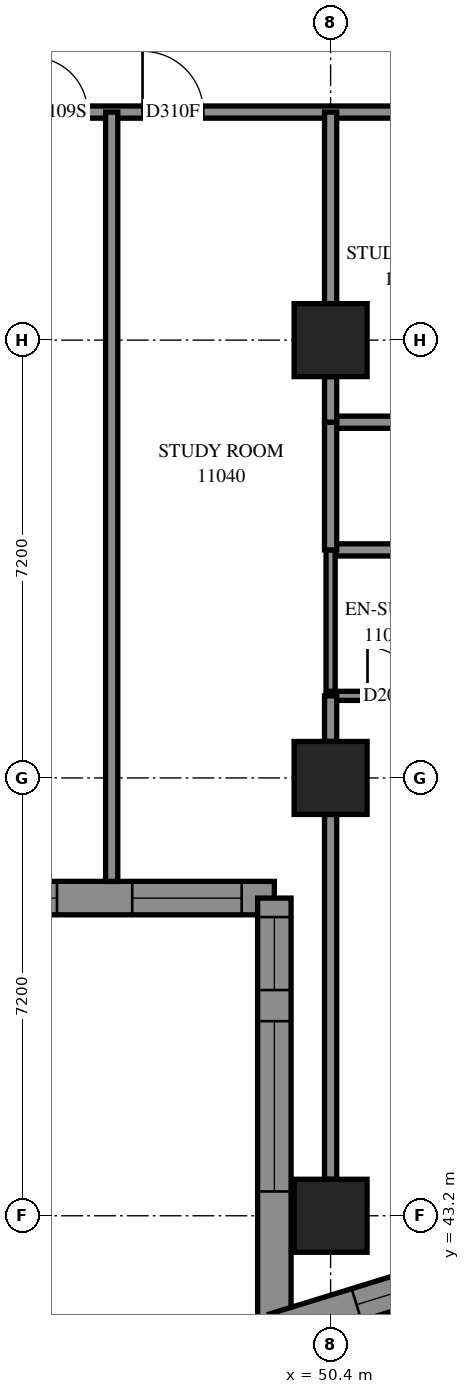
"""IFC4 building model, lengths in metres.
Left out: names, types, materials, properties, quantities, classifications, styles, units other than length and angle.
Written with IfcOpenShell. Run it as: python <this file> out.ifc"""

import sys

from ifc_helpers import new_model, si_unit, direction, frame, frame_2d, origin, origin_2d, place, context, subcontext, project, spatial, polyline, rectangle, outline, extrude, element, fill, save


model = new_model("IFC4")
c1 = context("Model", 3, precision=1e-05, world=origin(), true_north=direction((0.0, 1.0)))
c2 = subcontext(c1, "Body", "Model", "MODEL_VIEW")
j1 = project(units=[si_unit("LENGTHUNIT", "METRE"), si_unit("PLANEANGLEUNIT", "RADIAN")], contexts=[c1])
p1 = place(None, origin())
s1 = spatial("IfcSite", under=j1, at=p1, CompositionType="ELEMENT")
p2 = place(p1, origin())
s2 = spatial("IfcBuilding", under=s1, at=p2, CompositionType="ELEMENT")
p3 = place(p2, frame((0.0, 0.0, 44.0)))
s3 = spatial("IfcBuildingStorey", under=s2, at=p3, CompositionType="ELEMENT", Elevation=44.0)
for number, where, z_axis, x_axis in (
    (1, (50.4, 43.2, 0.0), (0.0, 0.0, 1.0), (1.0, 0.0, 0.0)),
    (2, (50.4, 50.4, 0.0), (0.0, 0.0, 1.0), (1.0, 0.0, 0.0)),
    (3, (50.4, 57.6, 0.0), (0.0, 0.0, 1.0), (1.0, 0.0, 0.0)),
):
    element("IfcColumn", number, at=place(p3, frame(where, z_axis=z_axis, x_axis=x_axis)), inside=s3, PredefinedType="COLUMN", context=c2, shape_type="SweptSolid", body=[
        extrude(rectangle(XDim=1.2, YDim=1.2, at=origin_2d()), origin(), (0.0, 0.0, 1.0), 3.1),
    ])
p4 = place(p3, frame((35.075, 48.424, 0.0), z_axis=(0.0, 0.0, 1.0), x_axis=(1.0, 0.0, 0.0)))
e4 = element("IfcWall", 4, at=p4, inside=s3, PredefinedType="SOLIDWALL", context=c2, shape_type="SweptSolid", body=[
    extrude(outline(polyline([(-0.275, -0.275), (14.125, -0.275), (14.675, 0.275), (0.275, 0.275), (-0.275, -0.275)])), origin(), (0.0, 0.0, 1.0), 3.1),
])
p5 = place(p4, frame((1.825, 0.0, 0.7)))
e5 = element("IfcOpeningElement", 5, at=p5, cuts=e4, PredefinedType="OPENING", context=c2, shape_type="SweptSolid", body=[
    extrude(rectangle(XDim=1.8, YDim=2.0, at=frame_2d((0.9, 1.0))), frame((0.0, 0.285, 0.0), z_axis=(0.0, -1.0, 0.0), x_axis=(1.0, 0.0, 0.0)), (0.0, 0.0, 1.0), 0.57),
])
p6 = place(p4, frame((5.425, 0.0, 0.7)))
e6 = element("IfcOpeningElement", 6, at=p6, cuts=e4, PredefinedType="OPENING", context=c2, shape_type="SweptSolid", body=[
    extrude(rectangle(XDim=1.8, YDim=2.0, at=frame_2d((0.9, 1.0))), frame((0.0, 0.285, 0.0), z_axis=(0.0, -1.0, 0.0), x_axis=(1.0, 0.0, 0.0)), (0.0, 0.0, 1.0), 0.57),
])
p7 = place(p4, frame((9.025, 0.0, 0.7)))
e7 = element("IfcOpeningElement", 7, at=p7, cuts=e4, PredefinedType="OPENING", context=c2, shape_type="SweptSolid", body=[
    extrude(rectangle(XDim=1.8, YDim=2.0, at=frame_2d((0.9, 1.0))), frame((0.0, 0.285, 0.0), z_axis=(0.0, -1.0, 0.0), x_axis=(1.0, 0.0, 0.0)), (0.0, 0.0, 1.0), 0.57),
])
p8 = place(p4, frame((12.062, 0.0, 0.7)))
e8 = element("IfcOpeningElement", 8, at=p8, cuts=e4, PredefinedType="OPENING", context=c2, shape_type="SweptSolid", body=[
    extrude(rectangle(XDim=1.8, YDim=2.0, at=frame_2d((0.9, 1.0))), frame((0.0, 0.285, 0.0), z_axis=(0.0, -1.0, 0.0), x_axis=(1.0, 0.0, 0.0)), (0.0, 0.0, 1.0), 0.57),
])
p9 = place(p3, frame((49.475, 48.424, 0.0), z_axis=(0.0, 0.0, 1.0), x_axis=(0.0, -1.0, 0.0)))
e9 = element("IfcWall", 9, at=p9, inside=s3, PredefinedType="SOLIDWALL", context=c2, shape_type="SweptSolid", body=[
    extrude(outline(polyline([(0.275, -0.275), (7.475, -0.275), (6.73, 0.275), (-0.275, 0.275), (0.275, -0.275)])), origin(), (0.0, 0.0, 1.0), 3.1),
])
p10 = place(p9, frame((2.024, 0.0, 0.5)))
e10 = element("IfcOpeningElement", 10, at=p10, cuts=e9, PredefinedType="OPENING", context=c2, shape_type="SweptSolid", body=[
    extrude(rectangle(XDim=2.8, YDim=2.45, at=frame_2d((1.4, 1.225))), frame((0.0, 0.285, 0.0), z_axis=(0.0, -1.0, 0.0), x_axis=(1.0, 0.0, 0.0)), (0.0, 0.0, 1.0), 0.57),
])
p11 = place(p9, frame((0.312, 0.0, 0.5)))
e11 = element("IfcOpeningElement", 11, at=p11, cuts=e9, PredefinedType="OPENING", context=c2, shape_type="SweptSolid", body=[
    extrude(rectangle(XDim=1.2, YDim=2.45, at=frame_2d((0.6, 1.225))), frame((0.0, 0.285, 0.0), z_axis=(0.0, -1.0, 0.0), x_axis=(1.0, 0.0, 0.0)), (0.0, 0.0, 1.0), 0.57),
])
p12 = place(p3, frame((49.475, 41.321, 0.0), z_axis=(0.0, 0.0, 1.0), x_axis=(0.9557664095, 0.2941267931, 0.0)))
e12 = element("IfcWall", 12, at=p12, inside=s3, PredefinedType="SOLIDWALL", context=c2, shape_type="SweptSolid", body=[
    extrude(outline(polyline([(-0.372, -0.275), (3.201, -0.275), (3.321, 0.275), (0.372, 0.275), (-0.372, -0.275)])), origin(), (0.0, 0.0, 1.0), 3.1),
])
p13 = place(p12, frame((1.414, 0.0, 0.5)))
e13 = element("IfcOpeningElement", 13, at=p13, cuts=e12, PredefinedType="OPENING", context=c2, shape_type="SweptSolid", body=[
    extrude(rectangle(XDim=1.2, YDim=2.45, at=frame_2d((0.6, 1.225))), frame((0.0, 0.285, 0.0), z_axis=(0.0, -1.0, 0.0), x_axis=(1.0, 0.0, 0.0)), (0.0, 0.0, 1.0), 0.57),
])
p14 = place(p3, frame((28.8, 61.35, 0.0), z_axis=(0.0, 0.0, 1.0), x_axis=(1.0, 0.0, 0.0)))
e14 = element("IfcWall", 14, at=p14, inside=s3, PredefinedType="PARTITIONING", context=c2, shape_type="SweptSolid", body=[
    extrude(rectangle(XDim=24.15, YDim=0.2, at=frame_2d((12.075, 0.0))), origin(), (0.0, 0.0, 1.0), 3.1),
])
p15 = place(p14, frame((2.3, 0.0, 0.0)))
e15 = element("IfcOpeningElement", 15, at=p15, cuts=e14, PredefinedType="OPENING", context=c2, shape_type="SweptSolid", body=[
    extrude(rectangle(XDim=0.9, YDim=2.1, at=frame_2d((0.45, 1.05))), frame((0.0, 0.11, 0.0), z_axis=(0.0, -1.0, 0.0), x_axis=(1.0, 0.0, 0.0)), (0.0, 0.0, 1.0), 0.22),
])
p16 = place(p14, frame((4.125, 0.0, 0.0)))
e16 = element("IfcOpeningElement", 16, at=p16, cuts=e14, PredefinedType="OPENING", context=c2, shape_type="SweptSolid", body=[
    extrude(rectangle(XDim=1.0, YDim=2.1, at=frame_2d((0.5, 1.05))), frame((0.0, 0.11, 0.0), z_axis=(0.0, -1.0, 0.0), x_axis=(1.0, 0.0, 0.0)), (0.0, 0.0, 1.0), 0.22),
])
p17 = place(p14, frame((11.061, 0.0, 0.0)))
e17 = element("IfcOpeningElement", 17, at=p17, cuts=e14, PredefinedType="OPENING", context=c2, shape_type="SweptSolid", body=[
    extrude(rectangle(XDim=0.9, YDim=2.1, at=frame_2d((0.45, 1.05))), frame((0.0, 0.11, 0.0), z_axis=(0.0, -1.0, 0.0), x_axis=(1.0, 0.0, 0.0)), (0.0, 0.0, 1.0), 0.22),
])
p18 = place(p14, frame((16.7, 0.0, 0.0)))
e18 = element("IfcOpeningElement", 18, at=p18, cuts=e14, PredefinedType="OPENING", context=c2, shape_type="SweptSolid", body=[
    extrude(rectangle(XDim=0.9, YDim=2.1, at=frame_2d((0.45, 1.05))), frame((0.0, 0.11, 0.0), z_axis=(0.0, -1.0, 0.0), x_axis=(1.0, 0.0, 0.0)), (0.0, 0.0, 1.0), 0.22),
])
p19 = place(p14, frame((18.508, 0.0, 0.0)))
e19 = element("IfcOpeningElement", 19, at=p19, cuts=e14, PredefinedType="OPENING", context=c2, shape_type="SweptSolid", body=[
    extrude(rectangle(XDim=1.0, YDim=2.1, at=frame_2d((0.5, 1.05))), frame((0.0, 0.11, 0.0), z_axis=(0.0, -1.0, 0.0), x_axis=(1.0, 0.0, 0.0)), (0.0, 0.0, 1.0), 0.22),
])
p20 = place(p14, frame((22.882, 0.0, 0.0)))
e20 = element("IfcOpeningElement", 20, at=p20, cuts=e14, PredefinedType="OPENING", context=c2, shape_type="SweptSolid", body=[
    extrude(rectangle(XDim=1.0, YDim=2.1, at=frame_2d((0.5, 1.05))), frame((0.0, 0.11, 0.0), z_axis=(0.0, -1.0, 0.0), x_axis=(1.0, 0.0, 0.0)), (0.0, 0.0, 1.0), 0.22),
])
p21 = place(p3, frame((46.8, 48.699, 0.0), z_axis=(0.0, 0.0, 1.0), x_axis=(0.0, 1.0, 0.0)))
e21 = element("IfcWall", 21, at=p21, inside=s3, PredefinedType="PARTITIONING", context=c2, shape_type="SweptSolid", body=[
    extrude(rectangle(XDim=12.651, YDim=0.2, at=frame_2d((6.325, 0.0))), origin(), (0.0, 0.0, 1.0), 3.1),
])
p22 = place(p3, frame((50.4, 43.8, 0.0), z_axis=(0.0, 0.0, 1.0), x_axis=(0.0, 1.0, 0.0)))
e22 = element("IfcWall", 22, at=p22, inside=s3, PredefinedType="PARTITIONING", context=c2, shape_type="SweptSolid", body=[
    extrude(rectangle(XDim=6.0, YDim=0.2, at=frame_2d((3.0, 0.0))), origin(), (0.0, 0.0, 1.0), 2.6),
])
p23 = place(p3, frame((50.4, 54.15, 0.0), z_axis=(0.0, 0.0, 1.0), x_axis=(1.0, 0.0, 0.0)))
e23 = element("IfcWall", 23, at=p23, inside=s3, PredefinedType="PARTITIONING", context=c2, shape_type="SweptSolid", body=[
    extrude(rectangle(XDim=4.7, YDim=0.2, at=frame_2d((2.35, 0.0))), origin(), (0.0, 0.0, 1.0), 3.1),
])
p24 = place(p23, frame((2.3, 0.0, 0.0)))
e24 = element("IfcOpeningElement", 24, at=p24, cuts=e23, PredefinedType="OPENING", context=c2, shape_type="SweptSolid", body=[
    extrude(rectangle(XDim=0.9, YDim=2.1, at=frame_2d((0.45, 1.05))), frame((0.0, 0.11, 0.0), z_axis=(0.0, -1.0, 0.0), x_axis=(1.0, 0.0, 0.0)), (0.0, 0.0, 1.0), 0.22),
])
p25 = place(p3, frame((50.4, 58.2, 0.0), z_axis=(0.0, 0.0, 1.0), x_axis=(0.0, 1.0, 0.0)))
e25 = element("IfcWall", 25, at=p25, inside=s3, PredefinedType="PARTITIONING", context=c2, shape_type="SweptSolid", body=[
    extrude(rectangle(XDim=3.15, YDim=0.2, at=frame_2d((1.575, 0.0))), origin(), (0.0, 0.0, 1.0), 3.1),
])
p26 = place(p3, frame((50.4, 56.25, 0.0), z_axis=(0.0, 0.0, 1.0), x_axis=(1.0, 0.0, 0.0)))
e26 = element("IfcWall", 26, at=p26, inside=s3, PredefinedType="PARTITIONING", context=c2, shape_type="SweptSolid", body=[
    extrude(rectangle(XDim=2.55, YDim=0.2, at=frame_2d((1.275, 0.0))), origin(), (0.0, 0.0, 1.0), 3.1),
])
p27 = place(p3, frame((50.4, 51.75, 0.0), z_axis=(0.0, 0.0, 1.0), x_axis=(0.0, 1.0, 0.0)))
e27 = element("IfcWall", 27, at=p27, inside=s3, PredefinedType="PARTITIONING", context=c2, shape_type="SweptSolid", body=[
    extrude(rectangle(XDim=2.4, YDim=0.15, at=frame_2d((1.2, 0.0))), origin(), (0.0, 0.0, 1.0), 3.1),
])
p28 = place(p3, frame((50.4, 54.15, 0.0), z_axis=(0.0, 0.0, 1.0), x_axis=(0.0, 1.0, 0.0)))
e28 = element("IfcWall", 28, at=p28, inside=s3, PredefinedType="PARTITIONING", context=c2, shape_type="SweptSolid", body=[
    extrude(rectangle(XDim=2.1, YDim=0.2, at=frame_2d((1.05, 0.0))), origin(), (0.0, 0.0, 1.0), 3.1),
])
p29 = place(p3, frame((50.4, 51.75, 0.0), z_axis=(0.0, 0.0, 1.0), x_axis=(1.0, 0.0, 0.0)))
e29 = element("IfcWall", 29, at=p29, inside=s3, PredefinedType="PARTITIONING", context=c2, shape_type="SweptSolid", body=[
    extrude(rectangle(XDim=1.9, YDim=0.15, at=frame_2d((0.95, 0.0))), origin(), (0.0, 0.0, 1.0), 3.1),
])
p30 = place(p29, frame((0.607, 0.0, 0.0)))
e30 = element("IfcOpeningElement", 30, at=p30, cuts=e29, PredefinedType="OPENING", context=c2, shape_type="SweptSolid", body=[
    extrude(rectangle(XDim=0.8, YDim=2.1, at=frame_2d((0.4, 1.05))), frame((0.0, 0.085, 0.0), z_axis=(0.0, -1.0, 0.0), x_axis=(1.0, 0.0, 0.0)), (0.0, 0.0, 1.0), 0.17),
])
for number, where, z_axis, x_axis in (
    (31, (50.4, 51.0, 0.0), (0.0, 0.0, 1.0), (0.0, 1.0, 0.0)),
    (32, (50.4, 56.25, 0.0), (0.0, 0.0, 1.0), (0.0, 1.0, 0.0)),
):
    element("IfcWall", number, at=place(p3, frame(where, z_axis=z_axis, x_axis=x_axis)), inside=s3, PredefinedType="PARTITIONING", context=c2, shape_type="SweptSolid", body=[
        extrude(rectangle(XDim=0.75, YDim=0.2, at=frame_2d((0.375, 0.0))), origin(), (0.0, 0.0, 1.0), 3.1),
    ])
p31 = place(p7, origin())
e33 = element("IfcWindow", 33, at=p31, inside=s3, PartitioningType="SINGLE_PANEL", PredefinedType="WINDOW", context=c2, shape_type="SweptSolid", body=[
    extrude(rectangle(XDim=1.8, YDim=2.0, at=frame_2d((0.9, 1.0))), frame((0.0, 0.155, 0.0), z_axis=(0.0, -1.0, 0.0), x_axis=(1.0, 0.0, 0.0)), (0.0, 0.0, 1.0), 0.06),
])
fill(e7, e33)
p32 = place(p8, origin())
e34 = element("IfcWindow", 34, at=p32, inside=s3, PartitioningType="SINGLE_PANEL", PredefinedType="WINDOW", context=c2, shape_type="SweptSolid", body=[
    extrude(rectangle(XDim=1.8, YDim=2.0, at=frame_2d((0.9, 1.0))), frame((0.0, 0.155, 0.0), z_axis=(0.0, -1.0, 0.0), x_axis=(1.0, 0.0, 0.0)), (0.0, 0.0, 1.0), 0.06),
])
fill(e8, e34)
p33 = place(p10, origin())
e35 = element("IfcWindow", 35, at=p33, inside=s3, PartitioningType="SINGLE_PANEL", PredefinedType="WINDOW", context=c2, shape_type="SweptSolid", body=[
    extrude(rectangle(XDim=2.8, YDim=2.45, at=frame_2d((1.4, 1.225))), frame((0.0, 0.155, 0.0), z_axis=(0.0, -1.0, 0.0), x_axis=(1.0, 0.0, 0.0)), (0.0, 0.0, 1.0), 0.06),
])
fill(e10, e35)
p34 = place(p11, origin())
e36 = element("IfcWindow", 36, at=p34, inside=s3, PartitioningType="SINGLE_PANEL", PredefinedType="WINDOW", context=c2, shape_type="SweptSolid", body=[
    extrude(rectangle(XDim=1.2, YDim=2.45, at=frame_2d((0.6, 1.225))), frame((0.0, 0.155, 0.0), z_axis=(0.0, -1.0, 0.0), x_axis=(1.0, 0.0, 0.0)), (0.0, 0.0, 1.0), 0.06),
])
fill(e11, e36)
p35 = place(p13, origin())
e37 = element("IfcWindow", 37, at=p35, inside=s3, PartitioningType="SINGLE_PANEL", PredefinedType="WINDOW", context=c2, shape_type="SweptSolid", body=[
    extrude(rectangle(XDim=1.2, YDim=2.45, at=frame_2d((0.6, 1.225))), frame((0.0, 0.155, 0.0), z_axis=(0.0, -1.0, 0.0), x_axis=(1.0, 0.0, 0.0)), (0.0, 0.0, 1.0), 0.06),
])
fill(e13, e37)
p36 = place(p18, origin())
e38 = element("IfcDoor", 38, at=p36, inside=s3, OperationType="SINGLE_SWING_LEFT", PredefinedType="DOOR", context=c2, shape_type="SweptSolid", body=[
    extrude(rectangle(XDim=0.9, YDim=2.1, at=frame_2d((0.45, 1.05))), frame((0.0, 0.025, 0.0), z_axis=(0.0, -1.0, 0.0), x_axis=(1.0, 0.0, 0.0)), (0.0, 0.0, 1.0), 0.05),
])
fill(e18, e38)
p37 = place(p19, origin())
e39 = element("IfcDoor", 39, at=p37, inside=s3, OperationType="SINGLE_SWING_RIGHT", PredefinedType="DOOR", context=c2, shape_type="SweptSolid", body=[
    extrude(rectangle(XDim=1.0, YDim=2.1, at=frame_2d((0.5, 1.05))), frame((0.0, 0.025, 0.0), z_axis=(0.0, -1.0, 0.0), x_axis=(1.0, 0.0, 0.0)), (0.0, 0.0, 1.0), 0.05),
])
fill(e19, e39)
p38 = place(p30, origin())
e40 = element("IfcDoor", 40, at=p38, inside=s3, OperationType="SINGLE_SWING_RIGHT", PredefinedType="DOOR", context=c2, shape_type="SweptSolid", body=[
    extrude(rectangle(XDim=0.8, YDim=2.1, at=frame_2d((0.4, 1.05))), frame((0.0, 0.025, 0.0), z_axis=(0.0, -1.0, 0.0), x_axis=(1.0, 0.0, 0.0)), (0.0, 0.0, 1.0), 0.05),
])
fill(e30, e40)
save(model, sys.argv[1])
